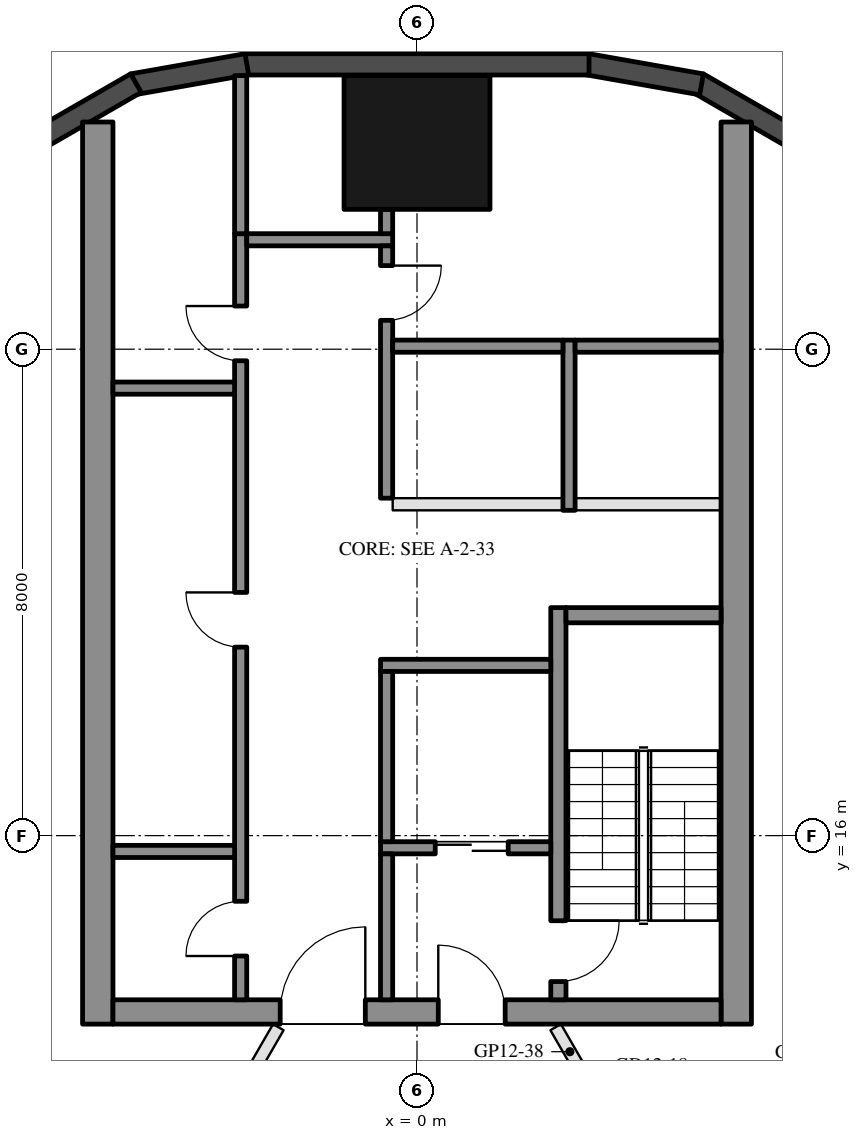
"""IFC4 building model, lengths in metres.
Left out: names, types, materials, properties, quantities, classifications, styles, units other than length and angle.
Written with IfcOpenShell. Run it as: python <this file> out.ifc"""

import sys

from ifc_helpers import new_model, si_unit, direction, frame, frame_2d, origin, origin_2d, place, context, subcontext, project, spatial, rectangle, hollow_rectangle, extrude, element, fill, save


model = new_model("IFC4")
c1 = context("Model", 3, precision=1e-05, world=origin(), true_north=direction((0.0, 1.0)))
c2 = subcontext(c1, "Body", "Model", "MODEL_VIEW")
j1 = project(units=[si_unit("LENGTHUNIT", "METRE"), si_unit("PLANEANGLEUNIT", "RADIAN")], contexts=[c1])
p1 = place(None, origin())
s1 = spatial("IfcSite", under=j1, at=p1, CompositionType="ELEMENT")
p2 = place(p1, origin())
s2 = spatial("IfcBuilding", under=s1, at=p2, CompositionType="ELEMENT")
p3 = place(p2, frame((0.0, 0.0, 146.6)))
s3 = spatial("IfcBuildingStorey", under=s2, at=p3, CompositionType="ELEMENT", Elevation=146.6)
p4 = place(p3, frame((0.0, 27.4, 0.0), z_axis=(0.0, 0.0, 1.0), x_axis=(1.0, 0.0, 0.0)))
e1 = element("IfcColumn", 1, at=p4, inside=s3, PredefinedType="COLUMN", context=c2, shape_type="SweptSolid", body=[
    extrude(hollow_rectangle(XDim=2.4, YDim=2.2, WallThickness=0.06, at=origin_2d()), origin(), (0.0, 0.0, 1.0), 3.7),
])
for number, where, z_axis, x_axis in (
    (2, (6.277, 27.422, 0.0), (0.0, 0.0, 1.0), (-0.866, 0.5, 0.0)),
    (3, (4.68, 28.356, 0.0), (0.0, 0.0, 1.0), (-0.985, 0.174, 0.0)),
):
    element("IfcWall", number, at=place(p3, frame(where, z_axis=z_axis, x_axis=x_axis)), inside=s3, PredefinedType="SOLIDWALL", context=c2, shape_type="SweptSolid", body=[
        extrude(rectangle(XDim=1.91, YDim=0.35, at=frame_2d((0.955, 0.0))), origin(), (0.0, 0.0, 1.0), 3.55),
    ])
p5 = place(p3, frame((2.829, 28.685, 0.0), z_axis=(0.0, 0.0, 1.0), x_axis=(-1.0, 0.0, 0.0)))
e4 = element("IfcWall", 4, at=p5, inside=s3, PredefinedType="SOLIDWALL", context=c2, shape_type="SweptSolid", body=[
    extrude(rectangle(XDim=5.658, YDim=0.35, at=frame_2d((2.829, 0.0))), origin(), (0.0, 0.0, 1.0), 3.55),
])
for number, where, z_axis, x_axis in (
    (5, (-2.799, 28.688, 0.0), (0.0, 0.0, 1.0), (-0.985, -0.174, 0.0)),
    (6, (-4.623, 28.377, 0.0), (0.0, 0.0, 1.0), (-0.866, -0.5, 0.0)),
):
    element("IfcWall", number, at=place(p3, frame(where, z_axis=z_axis, x_axis=x_axis)), inside=s3, PredefinedType="SOLIDWALL", context=c2, shape_type="SweptSolid", body=[
        extrude(rectangle(XDim=1.91, YDim=0.35, at=frame_2d((0.955, 0.0))), origin(), (0.0, 0.0, 1.0), 3.55),
    ])
for number, where, z_axis, x_axis in (
    (7, (5.25, 12.9, 0.0), (0.0, 0.0, 1.0), (0.0, 1.0, 0.0)),
    (8, (-5.25, 12.9, 0.0), (0.0, 0.0, 1.0), (0.0, 1.0, 0.0)),
):
    element("IfcWall", number, at=place(p3, frame(where, z_axis=z_axis, x_axis=x_axis)), inside=s3, PredefinedType="SHEAR", context=c2, shape_type="SweptSolid", body=[
        extrude(rectangle(XDim=14.837, YDim=0.5, at=frame_2d((7.418, 0.0))), origin(), (0.0, 0.0, 1.0), 3.5),
    ])
p6 = place(p3, frame((5.0, 13.1, 0.0), z_axis=(0.0, 0.0, 1.0), x_axis=(-1.0, 0.0, 0.0)))
e9 = element("IfcWall", 9, at=p6, inside=s3, PredefinedType="SHEAR", context=c2, shape_type="SweptSolid", body=[
    extrude(rectangle(XDim=10.0, YDim=0.4, at=frame_2d((5.0, 0.0))), origin(), (0.0, 0.0, 1.0), 3.5),
])
p7 = place(p6, frame((3.55, 0.0, 0.0)))
e10 = element("IfcOpeningElement", 10, at=p7, cuts=e9, PredefinedType="OPENING", context=c2, shape_type="SweptSolid", body=[
    extrude(rectangle(XDim=1.1, YDim=2.1, at=frame_2d((0.55, 1.05))), frame((0.0, 0.21, 0.0), z_axis=(0.0, -1.0, 0.0), x_axis=(1.0, 0.0, 0.0)), (0.0, 0.0, 1.0), 0.42),
])
p8 = place(p6, frame((5.85, 0.0, 0.0)))
e11 = element("IfcOpeningElement", 11, at=p8, cuts=e9, PredefinedType="OPENING", context=c2, shape_type="SweptSolid", body=[
    extrude(rectangle(XDim=1.4, YDim=2.1, at=frame_2d((0.7, 1.05))), frame((0.0, 0.21, 0.0), z_axis=(0.0, -1.0, 0.0), x_axis=(1.0, 0.0, 0.0)), (0.0, 0.0, 1.0), 0.42),
])
p9 = place(p3, frame((2.325, 13.3, 0.0), z_axis=(0.0, 0.0, 1.0), x_axis=(0.0, 1.0, 0.0)))
e12 = element("IfcWall", 12, at=p9, inside=s3, PredefinedType="SHEAR", context=c2, shape_type="SweptSolid", body=[
    extrude(rectangle(XDim=6.45, YDim=0.25, at=frame_2d((3.225, 0.0))), origin(), (0.0, 0.0, 1.0), 3.5),
])
p10 = place(p9, frame((0.3, 0.0, 0.0)))
e13 = element("IfcOpeningElement", 13, at=p10, cuts=e12, PredefinedType="OPENING", context=c2, shape_type="SweptSolid", body=[
    extrude(rectangle(XDim=1.0, YDim=2.1, at=frame_2d((0.5, 1.05))), frame((0.0, 0.135, 0.0), z_axis=(0.0, -1.0, 0.0), x_axis=(1.0, 0.0, 0.0)), (0.0, 0.0, 1.0), 0.27),
])
p11 = place(p3, frame((5.0, 19.625, 0.0), z_axis=(0.0, 0.0, 1.0), x_axis=(-1.0, 0.0, 0.0)))
e14 = element("IfcWall", 14, at=p11, inside=s3, PredefinedType="SHEAR", context=c2, shape_type="SweptSolid", body=[
    extrude(rectangle(XDim=2.55, YDim=0.25, at=frame_2d((1.275, 0.0))), origin(), (0.0, 0.0, 1.0), 3.5),
])
p12 = place(p3, frame((2.2, 18.8, 0.0), z_axis=(0.0, 0.0, 1.0), x_axis=(-1.0, 0.0, 0.0)))
e15 = element("IfcWall", 15, at=p12, inside=s3, PredefinedType="SHEAR", context=c2, shape_type="SweptSolid", body=[
    extrude(rectangle(XDim=2.8, YDim=0.2, at=frame_2d((1.4, 0.0))), origin(), (0.0, 0.0, 1.0), 3.5),
])
p13 = place(p3, frame((2.2, 15.8, 0.0), z_axis=(0.0, 0.0, 1.0), x_axis=(-1.0, 0.0, 0.0)))
e16 = element("IfcWall", 16, at=p13, inside=s3, PredefinedType="SHEAR", context=c2, shape_type="SweptSolid", body=[
    extrude(rectangle(XDim=2.8, YDim=0.2, at=frame_2d((1.4, 0.0))), origin(), (0.0, 0.0, 1.0), 3.5),
])
p14 = place(p13, frame((0.7, 0.0, 0.0)))
e17 = element("IfcOpeningElement", 17, at=p14, cuts=e16, PredefinedType="OPENING", context=c2, shape_type="SweptSolid", body=[
    extrude(rectangle(XDim=1.2, YDim=2.1, at=frame_2d((0.6, 1.05))), frame((0.0, 0.11, 0.0), z_axis=(0.0, -1.0, 0.0), x_axis=(1.0, 0.0, 0.0)), (0.0, 0.0, 1.0), 0.22),
])
p15 = place(p3, frame((-0.5, 15.9, 0.0), z_axis=(0.0, 0.0, 1.0), x_axis=(0.0, 1.0, 0.0)))
e18 = element("IfcWall", 18, at=p15, inside=s3, PredefinedType="SHEAR", context=c2, shape_type="SweptSolid", body=[
    extrude(rectangle(XDim=2.8, YDim=0.2, at=frame_2d((1.4, 0.0))), origin(), (0.0, 0.0, 1.0), 3.5),
])
p16 = place(p3, frame((-0.5, 13.3, 0.0), z_axis=(0.0, 0.0, 1.0), x_axis=(0.0, 1.0, 0.0)))
e19 = element("IfcWall", 19, at=p16, inside=s3, PredefinedType="SHEAR", context=c2, shape_type="SweptSolid", body=[
    extrude(rectangle(XDim=2.4, YDim=0.2, at=frame_2d((1.2, 0.0))), origin(), (0.0, 0.0, 1.0), 3.5),
])
p17 = place(p3, frame((-2.9, 13.3, 0.0), z_axis=(0.0, 0.0, 1.0), x_axis=(0.0, 1.0, 0.0)))
e20 = element("IfcWall", 20, at=p17, inside=s3, PredefinedType="SHEAR", context=c2, shape_type="SweptSolid", body=[
    extrude(rectangle(XDim=12.6, YDim=0.2, at=frame_2d((6.3, 0.0))), origin(), (0.0, 0.0, 1.0), 3.5),
])
p18 = place(p17, frame((0.72, 0.0, 0.0)))
e21 = element("IfcOpeningElement", 21, at=p18, cuts=e20, PredefinedType="OPENING", context=c2, shape_type="SweptSolid", body=[
    extrude(rectangle(XDim=0.9, YDim=2.1, at=frame_2d((0.45, 1.05))), frame((0.0, 0.11, 0.0), z_axis=(0.0, -1.0, 0.0), x_axis=(1.0, 0.0, 0.0)), (0.0, 0.0, 1.0), 0.22),
])
p19 = place(p17, frame((5.8, 0.0, 0.0)))
e22 = element("IfcOpeningElement", 22, at=p19, cuts=e20, PredefinedType="OPENING", context=c2, shape_type="SweptSolid", body=[
    extrude(rectangle(XDim=0.9, YDim=2.1, at=frame_2d((0.45, 1.05))), frame((0.0, 0.11, 0.0), z_axis=(0.0, -1.0, 0.0), x_axis=(1.0, 0.0, 0.0)), (0.0, 0.0, 1.0), 0.22),
])
p20 = place(p17, frame((10.51, 0.0, 0.0)))
e23 = element("IfcOpeningElement", 23, at=p20, cuts=e20, PredefinedType="OPENING", context=c2, shape_type="SweptSolid", body=[
    extrude(rectangle(XDim=0.9, YDim=2.1, at=frame_2d((0.45, 1.05))), frame((0.0, 0.11, 0.0), z_axis=(0.0, -1.0, 0.0), x_axis=(1.0, 0.0, 0.0)), (0.0, 0.0, 1.0), 0.22),
])
p21 = place(p3, frame((-0.4, 25.8, 0.0), z_axis=(0.0, 0.0, 1.0), x_axis=(-1.0, 0.0, 0.0)))
e24 = element("IfcWall", 24, at=p21, inside=s3, PredefinedType="SHEAR", context=c2, shape_type="SweptSolid", body=[
    extrude(rectangle(XDim=2.4, YDim=0.2, at=frame_2d((1.2, 0.0))), origin(), (0.0, 0.0, 1.0), 3.5),
])
p22 = place(p3, frame((-0.5, 21.55, 0.0), z_axis=(0.0, 0.0, 1.0), x_axis=(0.0, 1.0, 0.0)))
e25 = element("IfcWall", 25, at=p22, inside=s3, PredefinedType="SHEAR", context=c2, shape_type="SweptSolid", body=[
    extrude(rectangle(XDim=4.15, YDim=0.2, at=frame_2d((2.075, 0.0))), origin(), (0.0, 0.0, 1.0), 3.5),
])
p23 = place(p22, frame((2.925, 0.0, 0.0)))
e26 = element("IfcOpeningElement", 26, at=p23, cuts=e25, PredefinedType="OPENING", context=c2, shape_type="SweptSolid", body=[
    extrude(rectangle(XDim=0.9, YDim=2.1, at=frame_2d((0.45, 1.05))), frame((0.0, 0.11, 0.0), z_axis=(0.0, -1.0, 0.0), x_axis=(1.0, 0.0, 0.0)), (0.0, 0.0, 1.0), 0.22),
])
for number, where, z_axis, x_axis in (
    (27, (-3.0, 15.74, 0.0), (0.0, 0.0, 1.0), (-1.0, 0.0, 0.0)),
    (28, (-3.0, 23.36, 0.0), (0.0, 0.0, 1.0), (-1.0, 0.0, 0.0)),
):
    element("IfcWall", number, at=place(p3, frame(where, z_axis=z_axis, x_axis=x_axis)), inside=s3, PredefinedType="SHEAR", context=c2, shape_type="SweptSolid", body=[
        extrude(rectangle(XDim=2.0, YDim=0.2, at=frame_2d((1.0, 0.0))), origin(), (0.0, 0.0, 1.0), 3.5),
    ])
p24 = place(p3, frame((-0.5, 25.9, 0.0), z_axis=(0.0, 0.0, 1.0), x_axis=(0.0, 1.0, 0.0)))
e29 = element("IfcWall", 29, at=p24, inside=s3, PredefinedType="SHEAR", context=c2, shape_type="SweptSolid", body=[
    extrude(rectangle(XDim=0.4, YDim=0.2, at=frame_2d((0.2, 0.0))), origin(), (0.0, 0.0, 1.0), 3.5),
])
p25 = place(p3, frame((-2.9, 25.9, 0.0), z_axis=(0.0, 0.0, 1.0), x_axis=(0.0, 1.0, 0.0)))
e30 = element("IfcWall", 30, at=p25, inside=s3, PredefinedType="SHEAR", context=c2, shape_type="SweptSolid", body=[
    extrude(rectangle(XDim=2.6, YDim=0.2, at=frame_2d((1.3, 0.0))), origin(), (0.0, 0.0, 1.0), 3.5),
])
p26 = place(p3, frame((2.5, 21.35, 0.0), z_axis=(0.0, 0.0, 1.0), x_axis=(0.0, 1.0, 0.0)))
e31 = element("IfcWall", 31, at=p26, inside=s3, PredefinedType="SHEAR", context=c2, shape_type="SweptSolid", body=[
    extrude(rectangle(XDim=2.8, YDim=0.2, at=frame_2d((1.4, 0.0))), origin(), (0.0, 0.0, 1.0), 3.5),
])
p27 = place(p3, frame((5.0, 24.05, 0.0), z_axis=(0.0, 0.0, 1.0), x_axis=(-1.0, 0.0, 0.0)))
e32 = element("IfcWall", 32, at=p27, inside=s3, PredefinedType="SHEAR", context=c2, shape_type="SweptSolid", body=[
    extrude(rectangle(XDim=2.4, YDim=0.2, at=frame_2d((1.2, 0.0))), origin(), (0.0, 0.0, 1.0), 3.5),
])
p28 = place(p3, frame((2.4, 24.05, 0.0), z_axis=(0.0, 0.0, 1.0), x_axis=(-1.0, 0.0, 0.0)))
e33 = element("IfcWall", 33, at=p28, inside=s3, PredefinedType="SHEAR", context=c2, shape_type="SweptSolid", body=[
    extrude(rectangle(XDim=2.8, YDim=0.2, at=frame_2d((1.4, 0.0))), origin(), (0.0, 0.0, 1.0), 3.5),
])
p29 = place(p3, frame((5.0, 21.45, 0.0), z_axis=(0.0, 0.0, 1.0), x_axis=(-1.0, 0.0, 0.0)))
e34 = element("IfcWall", 34, at=p29, inside=s3, PredefinedType="PARTITIONING", context=c2, shape_type="SweptSolid", body=[
    extrude(rectangle(XDim=2.4, YDim=0.2, at=frame_2d((1.2, 0.0))), origin(), (0.0, 0.0, 1.0), 3.5),
])
p30 = place(p3, frame((2.4, 21.45, 0.0), z_axis=(0.0, 0.0, 1.0), x_axis=(-1.0, 0.0, 0.0)))
e35 = element("IfcWall", 35, at=p30, inside=s3, PredefinedType="PARTITIONING", context=c2, shape_type="SweptSolid", body=[
    extrude(rectangle(XDim=2.8, YDim=0.2, at=frame_2d((1.4, 0.0))), origin(), (0.0, 0.0, 1.0), 3.5),
])
p31 = place(p3, frame((13.697, 14.836, 0.0), z_axis=(0.0, 0.0, 1.0), x_axis=(-0.866027479907, -0.499996404033, 0.0)))
e36 = element("IfcWall", 36, at=p31, inside=s3, PredefinedType="PARTITIONING", context=c2, shape_type="SweptSolid", body=[
    extrude(rectangle(XDim=10.98, YDim=0.2, at=frame_2d((5.49, 0.0))), origin(), (0.0, 0.0, 1.0), 3.06),
])
p32 = place(p3, frame((-13.911, 12.665, 0.0), z_axis=(0.0, 0.0, 1.0), x_axis=(0.898639294085, -0.438688293811, 0.0)))
e37 = element("IfcWall", 37, at=p32, inside=s3, PredefinedType="PARTITIONING", context=c2, shape_type="SweptSolid", body=[
    extrude(rectangle(XDim=10.104, YDim=0.2, at=frame_2d((5.052, 0.0))), origin(), (0.0, 0.0, 1.0), 2.95),
])
p33 = place(p3, frame((2.281, 12.85, 0.0), z_axis=(0.0, 0.0, 1.0), x_axis=(0.500008716408, -0.866020371305, 0.0)))
e38 = element("IfcWall", 38, at=p33, inside=s3, PredefinedType="PARTITIONING", context=c2, shape_type="SweptSolid", body=[
    extrude(rectangle(XDim=3.888, YDim=0.2, at=frame_2d((1.944, 0.0))), origin(), (0.0, 0.0, 1.0), 2.95),
])
p34 = place(p33, frame((1.444, 0.0, 0.0)))
e39 = element("IfcOpeningElement", 39, at=p34, cuts=e38, PredefinedType="OPENING", context=c2, shape_type="SweptSolid", body=[
    extrude(rectangle(XDim=1.0, YDim=2.1, at=frame_2d((0.5, 1.05))), frame((0.0, 0.11, 0.0), z_axis=(0.0, -1.0, 0.0), x_axis=(1.0, 0.0, 0.0)), (0.0, 0.0, 1.0), 0.22),
])
p35 = place(p3, frame((-4.871, 8.363, 0.0), z_axis=(0.0, 0.0, 1.0), x_axis=(0.500016142392, 0.86601608377, 0.0)))
e40 = element("IfcWall", 40, at=p35, inside=s3, PredefinedType="PARTITIONING", context=c2, shape_type="SweptSolid", body=[
    extrude(rectangle(XDim=5.181, YDim=0.2, at=frame_2d((2.59, 0.0))), origin(), (0.0, 0.0, 1.0), 2.95),
])
p36 = place(p35, frame((2.09, 0.0, 0.0)))
e41 = element("IfcOpeningElement", 41, at=p36, cuts=e40, PredefinedType="OPENING", context=c2, shape_type="SweptSolid", body=[
    extrude(rectangle(XDim=1.0, YDim=2.1, at=frame_2d((0.5, 1.05))), frame((0.0, 0.11, 0.0), z_axis=(0.0, -1.0, 0.0), x_axis=(1.0, 0.0, 0.0)), (0.0, 0.0, 1.0), 0.22),
])
p37 = place(p14, origin())
e42 = element("IfcDoor", 42, at=p37, inside=s3, OperationType="DOUBLE_DOOR_SLIDING", PredefinedType="DOOR", context=c2, shape_type="SweptSolid", body=[
    extrude(rectangle(XDim=1.2, YDim=2.1, at=frame_2d((0.6, 1.05))), frame((0.0, 0.025, 0.0), z_axis=(0.0, -1.0, 0.0), x_axis=(1.0, 0.0, 0.0)), (0.0, 0.0, 1.0), 0.05),
])
fill(e17, e42)
p38 = place(p18, origin())
e43 = element("IfcDoor", 43, at=p38, inside=s3, OperationType="SINGLE_SWING_LEFT", PredefinedType="DOOR", context=c2, shape_type="SweptSolid", body=[
    extrude(rectangle(XDim=0.9, YDim=2.1, at=frame_2d((0.45, 1.05))), frame((0.0, 0.025, 0.0), z_axis=(0.0, -1.0, 0.0), x_axis=(1.0, 0.0, 0.0)), (0.0, 0.0, 1.0), 0.05),
])
fill(e21, e43)
p39 = place(p19, origin())
e44 = element("IfcDoor", 44, at=p39, inside=s3, OperationType="SINGLE_SWING_RIGHT", PredefinedType="DOOR", context=c2, shape_type="SweptSolid", body=[
    extrude(rectangle(XDim=0.9, YDim=2.1, at=frame_2d((0.45, 1.05))), frame((0.0, 0.025, 0.0), z_axis=(0.0, -1.0, 0.0), x_axis=(1.0, 0.0, 0.0)), (0.0, 0.0, 1.0), 0.05),
])
fill(e22, e44)
p40 = place(p20, origin())
e45 = element("IfcDoor", 45, at=p40, inside=s3, OperationType="SINGLE_SWING_RIGHT", PredefinedType="DOOR", context=c2, shape_type="SweptSolid", body=[
    extrude(rectangle(XDim=0.9, YDim=2.1, at=frame_2d((0.45, 1.05))), frame((0.0, 0.025, 0.0), z_axis=(0.0, -1.0, 0.0), x_axis=(1.0, 0.0, 0.0)), (0.0, 0.0, 1.0), 0.05),
])
fill(e23, e45)
p41 = place(p23, frame((0.9, 0.0, 0.0), z_axis=(0.0, 0.0, 1.0), x_axis=(-1.0, 0.0, 0.0)))
e46 = element("IfcDoor", 46, at=p41, inside=s3, OperationType="SINGLE_SWING_LEFT", PredefinedType="DOOR", context=c2, shape_type="SweptSolid", body=[
    extrude(rectangle(XDim=0.9, YDim=2.1, at=frame_2d((0.45, 1.05))), frame((0.0, 0.025, 0.0), z_axis=(0.0, -1.0, 0.0), x_axis=(1.0, 0.0, 0.0)), (0.0, 0.0, 1.0), 0.05),
])
fill(e26, e46)
p42 = place(p7, frame((1.1, 0.0, 0.0), z_axis=(0.0, 0.0, 1.0), x_axis=(-1.0, 0.0, 0.0)))
e47 = element("IfcDoor", 47, at=p42, inside=s3, OperationType="SINGLE_SWING_LEFT", PredefinedType="DOOR", context=c2, shape_type="SweptSolid", body=[
    extrude(rectangle(XDim=1.1, YDim=2.1, at=frame_2d((0.55, 1.05))), frame((0.0, 0.025, 0.0), z_axis=(0.0, -1.0, 0.0), x_axis=(1.0, 0.0, 0.0)), (0.0, 0.0, 1.0), 0.05),
])
fill(e10, e47)
p43 = place(p8, frame((1.4, 0.0, 0.0), z_axis=(0.0, 0.0, 1.0), x_axis=(-1.0, 0.0, 0.0)))
e48 = element("IfcDoor", 48, at=p43, inside=s3, OperationType="DOUBLE_DOOR_SINGLE_SWING", PredefinedType="DOOR", context=c2, shape_type="SweptSolid", body=[
    extrude(rectangle(XDim=1.4, YDim=2.1, at=frame_2d((0.7, 1.05))), frame((0.0, 0.025, 0.0), z_axis=(0.0, -1.0, 0.0), x_axis=(1.0, 0.0, 0.0)), (0.0, 0.0, 1.0), 0.05),
])
fill(e11, e48)
p44 = place(p10, frame((1.0, 0.0, 0.0), z_axis=(0.0, 0.0, 1.0), x_axis=(-1.0, 0.0, 0.0)))
e49 = element("IfcDoor", 49, at=p44, inside=s3, OperationType="SINGLE_SWING_LEFT", PredefinedType="DOOR", context=c2, shape_type="SweptSolid", body=[
    extrude(rectangle(XDim=1.0, YDim=2.1, at=frame_2d((0.5, 1.05))), frame((0.0, 0.025, 0.0), z_axis=(0.0, -1.0, 0.0), x_axis=(1.0, 0.0, 0.0)), (0.0, 0.0, 1.0), 0.05),
])
fill(e13, e49)
save(model, sys.argv[1])
